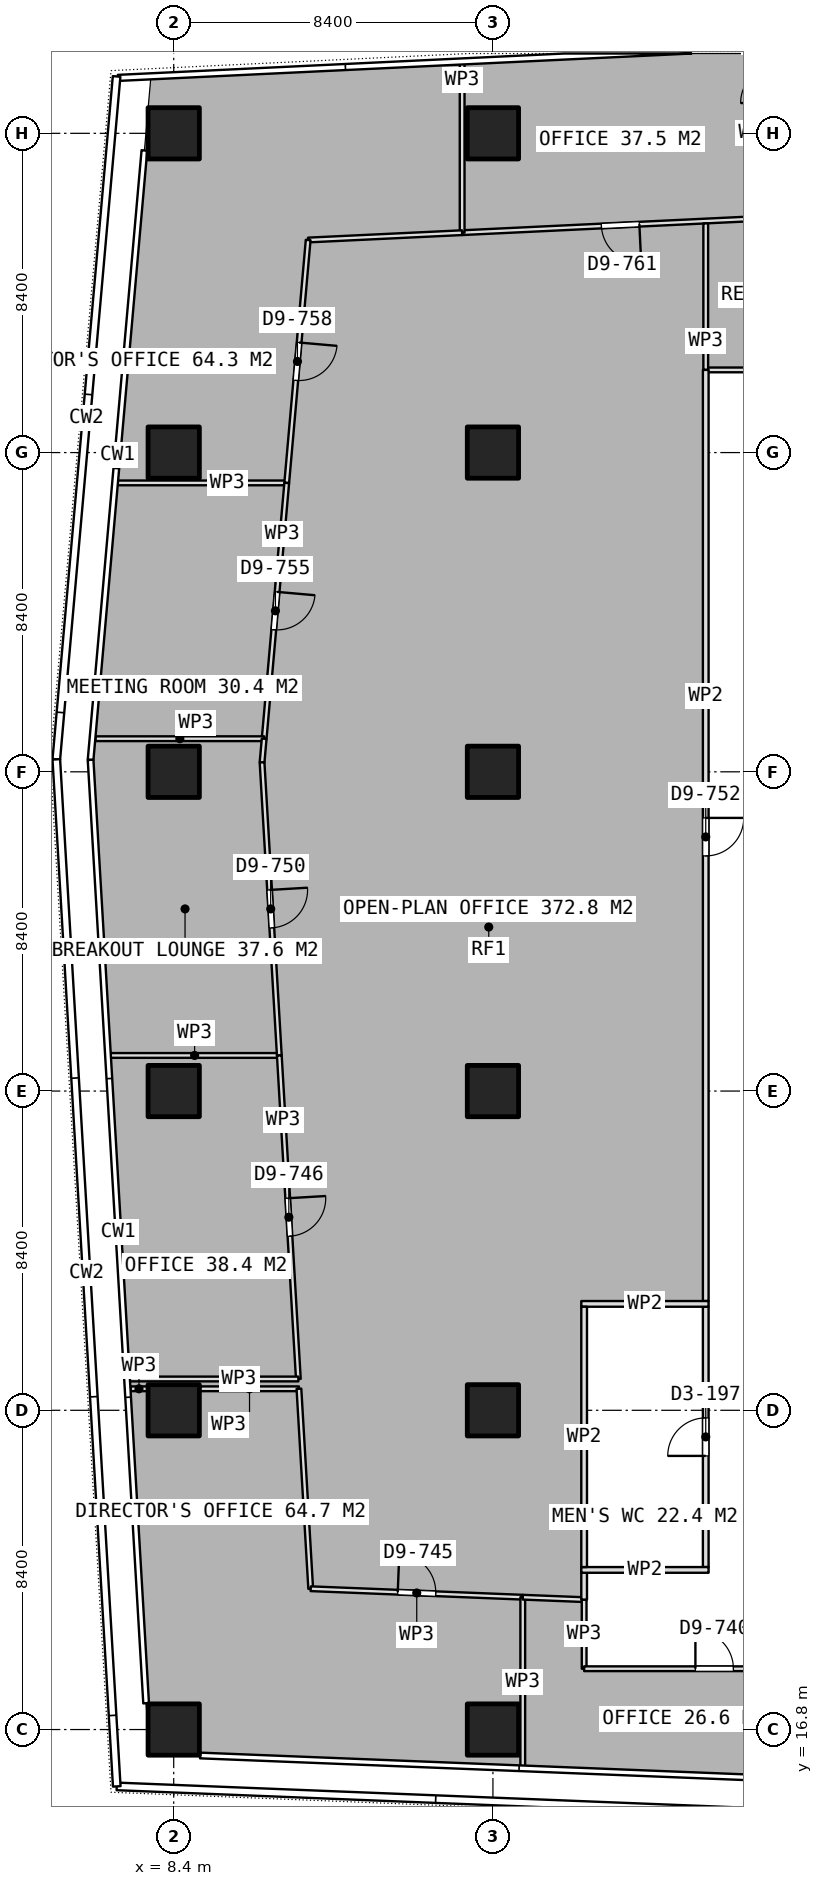
"""IFC4 building model, lengths in metres.
Left out: names, types, materials, properties, quantities, classifications, styles, units other than length and angle.
Written with IfcOpenShell. Run it as: python <this file> out.ifc"""

import sys

from ifc_helpers import new_model, si_unit, direction, frame, frame_2d, origin, origin_2d, place, context, subcontext, project, spatial, rectangle, extrude, element, fill, save


model = new_model("IFC4")
c1 = context("Model", 3, precision=1e-05, world=origin(), true_north=direction((0.0, 1.0)))
c2 = subcontext(c1, "Body", "Model", "MODEL_VIEW")
j1 = project(units=[si_unit("LENGTHUNIT", "METRE"), si_unit("PLANEANGLEUNIT", "RADIAN")], contexts=[c1])
p1 = place(None, origin())
s1 = spatial("IfcSite", under=j1, at=p1, CompositionType="ELEMENT")
p2 = place(p1, origin())
s2 = spatial("IfcBuilding", under=s1, at=p2, CompositionType="ELEMENT")
p3 = place(p2, frame((0.0, 0.0, 187.7)))
s3 = spatial("IfcBuildingStorey", under=s2, at=p3, CompositionType="ELEMENT", Elevation=187.7)
for number, where, z_axis, x_axis in (
    (1, (8.4, 16.8, 0.0), (0.0, 0.0, 1.0), (1.0, 0.0, 0.0)),
    (2, (8.4, 25.2, 0.0), (0.0, 0.0, 1.0), (1.0, 0.0, 0.0)),
    (3, (8.4, 33.6, 0.0), (0.0, 0.0, 1.0), (1.0, 0.0, 0.0)),
    (4, (8.4, 42.0, 0.0), (0.0, 0.0, 1.0), (1.0, 0.0, 0.0)),
    (5, (8.4, 50.4, 0.0), (0.0, 0.0, 1.0), (1.0, 0.0, 0.0)),
    (6, (8.4, 58.8, 0.0), (0.0, 0.0, 1.0), (1.0, 0.0, 0.0)),
    (7, (16.8, 16.8, 0.0), (0.0, 0.0, 1.0), (1.0, 0.0, 0.0)),
    (8, (16.8, 25.2, 0.0), (0.0, 0.0, 1.0), (1.0, 0.0, 0.0)),
    (9, (16.8, 33.6, 0.0), (0.0, 0.0, 1.0), (1.0, 0.0, 0.0)),
    (10, (16.8, 42.0, 0.0), (0.0, 0.0, 1.0), (1.0, 0.0, 0.0)),
    (11, (16.8, 50.4, 0.0), (0.0, 0.0, 1.0), (1.0, 0.0, 0.0)),
    (12, (16.8, 58.8, 0.0), (0.0, 0.0, 1.0), (1.0, 0.0, 0.0)),
):
    element("IfcColumn", number, at=place(p3, frame(where, z_axis=z_axis, x_axis=x_axis)), inside=s3, PredefinedType="COLUMN", context=c2, shape_type="SweptSolid", body=[
        extrude(rectangle(XDim=1.35, YDim=1.35, at=origin_2d()), origin(), (0.0, 0.0, 1.0), 3.75),
    ])
for number, where, z_axis, x_axis in (
    (13, (19.125, 21.0, 0.0), (0.0, 0.0, 1.0), (1.0, 0.0, 0.0)),
    (14, (19.125, 28.0, 0.0), (0.0, 0.0, 1.0), (1.0, 0.0, 0.0)),
):
    element("IfcWall", number, at=place(p3, frame(where, z_axis=z_axis, x_axis=x_axis)), inside=s3, PredefinedType="PARTITIONING", context=c2, shape_type="SweptSolid", body=[
        extrude(rectangle(XDim=3.35, YDim=0.15, at=frame_2d((1.675, 0.0))), origin(), (0.0, 0.0, 1.0), 3.5),
    ])
p4 = place(p3, frame((19.2, 21.075, 0.0), z_axis=(0.0, 0.0, 1.0), x_axis=(0.0, 1.0, 0.0)))
e15 = element("IfcWall", 15, at=p4, inside=s3, PredefinedType="PARTITIONING", context=c2, shape_type="SweptSolid", body=[
    extrude(rectangle(XDim=6.85, YDim=0.15, at=frame_2d((3.425, 0.0))), origin(), (0.0, 0.0, 1.0), 3.5),
])
p5 = place(p3, frame((22.4, 21.075, 0.0), z_axis=(0.0, 0.0, 1.0), x_axis=(0.0, 1.0, 0.0)))
e16 = element("IfcWall", 16, at=p5, inside=s3, PredefinedType="PARTITIONING", context=c2, shape_type="SweptSolid", body=[
    extrude(rectangle(XDim=6.85, YDim=0.15, at=frame_2d((3.425, 0.0))), origin(), (0.0, 0.0, 1.0), 3.5),
])
p6 = place(p5, frame((2.925, 0.0, 0.0)))
e17 = element("IfcOpeningElement", 17, at=p6, cuts=e16, PredefinedType="OPENING", context=c2, shape_type="SweptSolid", body=[
    extrude(rectangle(XDim=1.0, YDim=2.1, at=frame_2d((0.5, 1.05))), frame((0.0, 0.085, 0.0), z_axis=(0.0, -1.0, 0.0), x_axis=(1.0, 0.0, 0.0)), (0.0, 0.0, 1.0), 0.17),
])
p7 = place(p3, frame((7.267, 25.766, 0.0), z_axis=(0.0, 0.0, 1.0), x_axis=(1.0, 0.0, 0.0)))
e18 = element("IfcWall", 18, at=p7, inside=s3, PredefinedType="PARTITIONING", context=c2, shape_type="SweptSolid", body=[
    extrude(rectangle(XDim=0.438, YDim=0.125, at=frame_2d((0.219, 0.0))), origin(), (0.0, 0.0, 1.0), 3.5),
])
p8 = place(p3, frame((9.095, 25.766, 0.0), z_axis=(0.0, 0.0, 1.0), x_axis=(1.0, 0.0, 0.0)))
e19 = element("IfcWall", 19, at=p8, inside=s3, PredefinedType="PARTITIONING", context=c2, shape_type="SweptSolid", body=[
    extrude(rectangle(XDim=2.6, YDim=0.125, at=frame_2d((1.3, 0.0))), origin(), (0.0, 0.0, 1.0), 3.5),
])
p9 = place(p3, frame((11.695, 25.766, 0.0), z_axis=(0.0, 0.0, 1.0), x_axis=(0.058784478648, -0.998270697291, 0.0)))
e20 = element("IfcWall", 20, at=p9, inside=s3, PredefinedType="PARTITIONING", context=c2, shape_type="SweptSolid", body=[
    extrude(rectangle(XDim=5.27, YDim=0.125, at=frame_2d((2.635, 0.0))), origin(), (0.0, 0.0, 1.0), 3.5),
])
p10 = place(p3, frame((12.005, 20.505, 0.0), z_axis=(0.0, 0.0, 1.0), x_axis=(0.999203122171, -0.039913915407, 0.0)))
e21 = element("IfcWall", 21, at=p10, inside=s3, PredefinedType="PARTITIONING", context=c2, shape_type="SweptSolid", body=[
    extrude(rectangle(XDim=5.584, YDim=0.125, at=frame_2d((2.792, 0.0))), origin(), (0.0, 0.0, 1.0), 3.5),
])
p11 = place(p10, frame((2.292, 0.0, 0.0)))
e22 = element("IfcOpeningElement", 22, at=p11, cuts=e21, PredefinedType="OPENING", context=c2, shape_type="SweptSolid", body=[
    extrude(rectangle(XDim=1.0, YDim=2.1, at=frame_2d((0.5, 1.05))), frame((0.0, 0.073, 0.0), z_axis=(0.0, -1.0, 0.0), x_axis=(1.0, 0.0, 0.0)), (0.0, 0.0, 1.0), 0.145),
])
p12 = place(p3, frame((17.585, 20.282, 0.0), z_axis=(0.0, 0.0, 1.0), x_axis=(0.0, -1.0, 0.0)))
e23 = element("IfcWall", 23, at=p12, inside=s3, PredefinedType="PARTITIONING", context=c2, shape_type="SweptSolid", body=[
    extrude(rectangle(XDim=4.453, YDim=0.125, at=frame_2d((2.227, 0.0))), origin(), (0.0, 0.0, 1.0), 3.5),
])
p13 = place(p3, frame((17.586, 20.282, 0.0), z_axis=(0.0, 0.0, 1.0), x_axis=(0.999215619009, -0.039599832428, 0.0)))
e24 = element("IfcWall", 24, at=p13, inside=s3, PredefinedType="PARTITIONING", context=c2, shape_type="SweptSolid", body=[
    extrude(rectangle(XDim=1.615, YDim=0.125, at=frame_2d((0.808, 0.0))), origin(), (0.0, 0.0, 1.0), 3.5),
])
p14 = place(p3, frame((19.2, 20.218, 0.0), z_axis=(0.0, 0.0, 1.0), x_axis=(0.0, -1.0, 0.0)))
e25 = element("IfcWall", 25, at=p14, inside=s3, PredefinedType="PARTITIONING", context=c2, shape_type="SweptSolid", body=[
    extrude(rectangle(XDim=1.818, YDim=0.125, at=frame_2d((0.909, 0.0))), origin(), (0.0, 0.0, 1.0), 3.5),
])
p15 = place(p3, frame((19.2, 18.4, 0.0), z_axis=(0.0, 0.0, 1.0), x_axis=(1.0, 0.0, 0.0)))
e26 = element("IfcWall", 26, at=p15, inside=s3, PredefinedType="PARTITIONING", context=c2, shape_type="SweptSolid", body=[
    extrude(rectangle(XDim=6.857, YDim=0.125, at=frame_2d((3.428, 0.0))), origin(), (0.0, 0.0, 1.0), 3.5),
])
p16 = place(p15, frame((2.928, 0.0, 0.0)))
e27 = element("IfcOpeningElement", 27, at=p16, cuts=e26, PredefinedType="OPENING", context=c2, shape_type="SweptSolid", body=[
    extrude(rectangle(XDim=1.0, YDim=2.1, at=frame_2d((0.5, 1.05))), frame((0.0, 0.073, 0.0), z_axis=(0.0, -1.0, 0.0), x_axis=(1.0, 0.0, 0.0)), (0.0, 0.0, 1.0), 0.145),
])
p17 = place(p3, frame((24.317, 56.584, 0.0), z_axis=(0.0, 0.0, 1.0), x_axis=(-0.998859973319, -0.047736293327, 0.0)))
e28 = element("IfcWall", 28, at=p17, inside=s3, PredefinedType="PARTITIONING", context=c2, shape_type="SweptSolid", body=[
    extrude(rectangle(XDim=8.336, YDim=0.125, at=frame_2d((4.168, 0.0))), origin(), (0.0, 0.0, 1.0), 3.5),
])
p18 = place(p17, frame((3.668, 0.0, 0.0)))
e29 = element("IfcOpeningElement", 29, at=p18, cuts=e28, PredefinedType="OPENING", context=c2, shape_type="SweptSolid", body=[
    extrude(rectangle(XDim=1.0, YDim=2.1, at=frame_2d((0.5, 1.05))), frame((0.0, 0.073, 0.0), z_axis=(0.0, -1.0, 0.0), x_axis=(1.0, 0.0, 0.0)), (0.0, 0.0, 1.0), 0.145),
])
p19 = place(p3, frame((15.99, 56.186, 0.0), z_axis=(0.0, 0.0, 1.0), x_axis=(0.0, 1.0, 0.0)))
e30 = element("IfcWall", 30, at=p19, inside=s3, PredefinedType="PARTITIONING", context=c2, shape_type="SweptSolid", body=[
    extrude(rectangle(XDim=4.456, YDim=0.125, at=frame_2d((2.228, 0.0))), origin(), (0.0, 0.0, 1.0), 3.5),
])
p20 = place(p3, frame((11.374, 49.602, 0.0), z_axis=(0.0, 0.0, 1.0), x_axis=(-1.0, 0.0, 0.0)))
e31 = element("IfcWall", 31, at=p20, inside=s3, PredefinedType="PARTITIONING", context=c2, shape_type="SweptSolid", body=[
    extrude(rectangle(XDim=4.468, YDim=0.125, at=frame_2d((2.234, 0.0))), origin(), (0.0, 0.0, 1.0), 3.5),
])
p21 = place(p3, frame((15.989, 56.186, 0.0), z_axis=(0.0, 0.0, 1.0), x_axis=(-0.998865684895, -0.047616630914, 0.0)))
e32 = element("IfcWall", 32, at=p21, inside=s3, PredefinedType="PARTITIONING", context=c2, shape_type="SweptSolid", body=[
    extrude(rectangle(XDim=4.056, YDim=0.125, at=frame_2d((2.028, 0.0))), origin(), (0.0, 0.0, 1.0), 3.5),
])
p22 = place(p3, frame((11.938, 55.993, 0.0), z_axis=(0.0, 0.0, 1.0), x_axis=(-0.087903805485, -0.996128968046, 0.0)))
e33 = element("IfcWall", 33, at=p22, inside=s3, PredefinedType="PARTITIONING", context=c2, shape_type="SweptSolid", body=[
    extrude(rectangle(XDim=6.416, YDim=0.125, at=frame_2d((3.208, 0.0))), origin(), (0.0, 0.0, 1.0), 3.5),
])
p23 = place(p22, frame((2.708, 0.0, 0.0)))
e34 = element("IfcOpeningElement", 34, at=p23, cuts=e33, PredefinedType="OPENING", context=c2, shape_type="SweptSolid", body=[
    extrude(rectangle(XDim=1.0, YDim=2.1, at=frame_2d((0.5, 1.05))), frame((0.0, 0.073, 0.0), z_axis=(0.0, -1.0, 0.0), x_axis=(1.0, 0.0, 0.0)), (0.0, 0.0, 1.0), 0.145),
])
p24 = place(p3, frame((11.374, 49.601, 0.0), z_axis=(0.0, 0.0, 1.0), x_axis=(-0.087919121044, -0.9961276164, 0.0)))
e35 = element("IfcWall", 35, at=p24, inside=s3, PredefinedType="PARTITIONING", context=c2, shape_type="SweptSolid", body=[
    extrude(rectangle(XDim=6.756, YDim=0.125, at=frame_2d((3.378, 0.0))), origin(), (0.0, 0.0, 1.0), 3.5),
])
p25 = place(p24, frame((2.878, 0.0, 0.0)))
e36 = element("IfcOpeningElement", 36, at=p25, cuts=e35, PredefinedType="OPENING", context=c2, shape_type="SweptSolid", body=[
    extrude(rectangle(XDim=1.0, YDim=2.1, at=frame_2d((0.5, 1.05))), frame((0.0, 0.073, 0.0), z_axis=(0.0, -1.0, 0.0), x_axis=(1.0, 0.0, 0.0)), (0.0, 0.0, 1.0), 0.145),
])
p26 = place(p3, frame((10.78, 42.871, 0.0), z_axis=(0.0, 0.0, 1.0), x_axis=(-1.0, 0.0, 0.0)))
e37 = element("IfcWall", 37, at=p26, inside=s3, PredefinedType="PARTITIONING", context=c2, shape_type="SweptSolid", body=[
    extrude(rectangle(XDim=4.438, YDim=0.125, at=frame_2d((2.219, 0.0))), origin(), (0.0, 0.0, 1.0), 3.5),
])
p27 = place(p3, frame((11.179, 34.537, 0.0), z_axis=(0.0, 0.0, 1.0), x_axis=(-1.0, 0.0, 0.0)))
e38 = element("IfcWall", 38, at=p27, inside=s3, PredefinedType="PARTITIONING", context=c2, shape_type="SweptSolid", body=[
    extrude(rectangle(XDim=4.458, YDim=0.125, at=frame_2d((2.229, 0.0))), origin(), (0.0, 0.0, 1.0), 3.5),
])
p28 = place(p3, frame((10.78, 42.87, 0.0), z_axis=(0.0, 0.0, 1.0), x_axis=(-0.087962267132, -0.996123807346, 0.0)))
e39 = element("IfcWall", 39, at=p28, inside=s3, PredefinedType="PARTITIONING", context=c2, shape_type="SweptSolid", body=[
    extrude(rectangle(XDim=0.625, YDim=0.125, at=frame_2d((0.312, 0.0))), origin(), (0.0, 0.0, 1.0), 3.5),
])
p29 = place(p3, frame((10.725, 42.248, 0.0), z_axis=(0.0, 0.0, 1.0), x_axis=(0.058757225461, -0.998272301757, 0.0)))
e40 = element("IfcWall", 40, at=p29, inside=s3, PredefinedType="PARTITIONING", context=c2, shape_type="SweptSolid", body=[
    extrude(rectangle(XDim=7.724, YDim=0.125, at=frame_2d((3.862, 0.0))), origin(), (0.0, 0.0, 1.0), 3.5),
])
p30 = place(p29, frame((3.362, 0.0, 0.0)))
e41 = element("IfcOpeningElement", 41, at=p30, cuts=e40, PredefinedType="OPENING", context=c2, shape_type="SweptSolid", body=[
    extrude(rectangle(XDim=1.0, YDim=2.1, at=frame_2d((0.5, 1.05))), frame((0.0, 0.073, 0.0), z_axis=(0.0, -1.0, 0.0), x_axis=(1.0, 0.0, 0.0)), (0.0, 0.0, 1.0), 0.145),
])
p31 = place(p3, frame((11.179, 34.536, 0.0), z_axis=(0.0, 0.0, 1.0), x_axis=(0.058753912615, -0.998272496742, 0.0)))
e42 = element("IfcWall", 42, at=p31, inside=s3, PredefinedType="PARTITIONING", context=c2, shape_type="SweptSolid", body=[
    extrude(rectangle(XDim=8.527, YDim=0.125, at=frame_2d((4.263, 0.0))), origin(), (0.0, 0.0, 1.0), 3.5),
])
p32 = place(p31, frame((3.763, 0.0, 0.0)))
e43 = element("IfcOpeningElement", 43, at=p32, cuts=e42, PredefinedType="OPENING", context=c2, shape_type="SweptSolid", body=[
    extrude(rectangle(XDim=1.0, YDim=2.1, at=frame_2d((0.5, 1.05))), frame((0.0, 0.073, 0.0), z_axis=(0.0, -1.0, 0.0), x_axis=(1.0, 0.0, 0.0)), (0.0, 0.0, 1.0), 0.145),
])
p33 = place(p3, frame((11.68, 26.024, 0.0), z_axis=(0.0, 0.0, 1.0), x_axis=(-1.0, 0.0, 0.0)))
e44 = element("IfcWall", 44, at=p33, inside=s3, PredefinedType="PARTITIONING", context=c2, shape_type="SweptSolid", body=[
    extrude(rectangle(XDim=4.458, YDim=0.125, at=frame_2d((2.229, 0.0))), origin(), (0.0, 0.0, 1.0), 3.5),
])
p34 = place(p3, frame((28.4, 52.575, 0.0), z_axis=(0.0, 0.0, 1.0), x_axis=(-1.0, 0.0, 0.0)))
e45 = element("IfcWall", 45, at=p34, inside=s3, PredefinedType="PARTITIONING", context=c2, shape_type="SweptSolid", body=[
    extrude(rectangle(XDim=6.0, YDim=0.125, at=frame_2d((3.0, 0.0))), origin(), (0.0, 0.0, 1.0), 3.5),
])
p35 = place(p34, frame((2.5, 0.0, 0.0)))
e46 = element("IfcOpeningElement", 46, at=p35, cuts=e45, PredefinedType="OPENING", context=c2, shape_type="SweptSolid", body=[
    extrude(rectangle(XDim=1.0, YDim=2.1, at=frame_2d((0.5, 1.05))), frame((0.0, 0.073, 0.0), z_axis=(0.0, -1.0, 0.0), x_axis=(1.0, 0.0, 0.0)), (0.0, 0.0, 1.0), 0.145),
])
p36 = place(p3, frame((22.4, 52.575, 0.0), z_axis=(0.0, 0.0, 1.0), x_axis=(0.0, 1.0, 0.0)))
e47 = element("IfcWall", 47, at=p36, inside=s3, PredefinedType="PARTITIONING", context=c2, shape_type="SweptSolid", body=[
    extrude(rectangle(XDim=3.855, YDim=0.125, at=frame_2d((1.927, 0.0))), origin(), (0.0, 0.0, 1.0), 3.5),
])
p37 = place(p3, frame((22.4, 52.575, 0.0), z_axis=(0.0, 0.0, 1.0), x_axis=(0.0, -1.0, 0.0)))
e48 = element("IfcWall", 48, at=p37, inside=s3, PredefinedType="PARTITIONING", context=c2, shape_type="SweptSolid", body=[
    extrude(rectangle(XDim=24.5, YDim=0.15, at=frame_2d((12.25, 0.0))), origin(), (0.0, 0.0, 1.0), 3.5),
])
p38 = place(p37, frame((11.788, 0.0, 0.0)))
e49 = element("IfcOpeningElement", 49, at=p38, cuts=e48, PredefinedType="OPENING", context=c2, shape_type="SweptSolid", body=[
    extrude(rectangle(XDim=1.0, YDim=2.1, at=frame_2d((0.5, 1.05))), frame((0.0, 0.085, 0.0), z_axis=(0.0, -1.0, 0.0), x_axis=(1.0, 0.0, 0.0)), (0.0, 0.0, 1.0), 0.17),
])
p39 = place(p3, frame((19.2, 21.075, 0.0), z_axis=(0.0, 0.0, 1.0), x_axis=(0.0, -1.0, 0.0)))
e50 = element("IfcWall", 50, at=p39, inside=s3, PredefinedType="PARTITIONING", context=c2, shape_type="SweptSolid", body=[
    extrude(rectangle(XDim=0.857, YDim=0.15, at=frame_2d((0.428, 0.0))), origin(), (0.0, 0.0, 1.0), 3.5),
])
p40 = place(p6, origin())
e51 = element("IfcDoor", 51, at=p40, inside=s3, OperationType="SINGLE_SWING_LEFT", PredefinedType="DOOR", context=c2, shape_type="SweptSolid", body=[
    extrude(rectangle(XDim=1.0, YDim=2.1, at=frame_2d((0.5, 1.05))), frame((0.0, 0.025, 0.0), z_axis=(0.0, -1.0, 0.0), x_axis=(1.0, 0.0, 0.0)), (0.0, 0.0, 1.0), 0.05),
])
fill(e17, e51)
p41 = place(p11, origin())
e52 = element("IfcDoor", 52, at=p41, inside=s3, OperationType="SINGLE_SWING_LEFT", PredefinedType="DOOR", context=c2, shape_type="SweptSolid", body=[
    extrude(rectangle(XDim=1.0, YDim=2.1, at=frame_2d((0.5, 1.05))), frame((0.0, 0.025, 0.0), z_axis=(0.0, -1.0, 0.0), x_axis=(1.0, 0.0, 0.0)), (0.0, 0.0, 1.0), 0.05),
])
fill(e22, e52)
p42 = place(p16, origin())
e53 = element("IfcDoor", 53, at=p42, inside=s3, OperationType="SINGLE_SWING_LEFT", PredefinedType="DOOR", context=c2, shape_type="SweptSolid", body=[
    extrude(rectangle(XDim=1.0, YDim=2.1, at=frame_2d((0.5, 1.05))), frame((0.0, 0.025, 0.0), z_axis=(0.0, -1.0, 0.0), x_axis=(1.0, 0.0, 0.0)), (0.0, 0.0, 1.0), 0.05),
])
fill(e27, e53)
p43 = place(p18, origin())
e54 = element("IfcDoor", 54, at=p43, inside=s3, OperationType="SINGLE_SWING_LEFT", PredefinedType="DOOR", context=c2, shape_type="SweptSolid", body=[
    extrude(rectangle(XDim=1.0, YDim=2.1, at=frame_2d((0.5, 1.05))), frame((0.0, 0.025, 0.0), z_axis=(0.0, -1.0, 0.0), x_axis=(1.0, 0.0, 0.0)), (0.0, 0.0, 1.0), 0.05),
])
fill(e29, e54)
p44 = place(p23, origin())
e55 = element("IfcDoor", 55, at=p44, inside=s3, OperationType="SINGLE_SWING_LEFT", PredefinedType="DOOR", context=c2, shape_type="SweptSolid", body=[
    extrude(rectangle(XDim=1.0, YDim=2.1, at=frame_2d((0.5, 1.05))), frame((0.0, 0.025, 0.0), z_axis=(0.0, -1.0, 0.0), x_axis=(1.0, 0.0, 0.0)), (0.0, 0.0, 1.0), 0.05),
])
fill(e34, e55)
p45 = place(p25, origin())
e56 = element("IfcDoor", 56, at=p45, inside=s3, OperationType="SINGLE_SWING_LEFT", PredefinedType="DOOR", context=c2, shape_type="SweptSolid", body=[
    extrude(rectangle(XDim=1.0, YDim=2.1, at=frame_2d((0.5, 1.05))), frame((0.0, 0.025, 0.0), z_axis=(0.0, -1.0, 0.0), x_axis=(1.0, 0.0, 0.0)), (0.0, 0.0, 1.0), 0.05),
])
fill(e36, e56)
p46 = place(p30, origin())
e57 = element("IfcDoor", 57, at=p46, inside=s3, OperationType="SINGLE_SWING_LEFT", PredefinedType="DOOR", context=c2, shape_type="SweptSolid", body=[
    extrude(rectangle(XDim=1.0, YDim=2.1, at=frame_2d((0.5, 1.05))), frame((0.0, 0.025, 0.0), z_axis=(0.0, -1.0, 0.0), x_axis=(1.0, 0.0, 0.0)), (0.0, 0.0, 1.0), 0.05),
])
fill(e41, e57)
p47 = place(p32, origin())
e58 = element("IfcDoor", 58, at=p47, inside=s3, OperationType="SINGLE_SWING_LEFT", PredefinedType="DOOR", context=c2, shape_type="SweptSolid", body=[
    extrude(rectangle(XDim=1.0, YDim=2.1, at=frame_2d((0.5, 1.05))), frame((0.0, 0.025, 0.0), z_axis=(0.0, -1.0, 0.0), x_axis=(1.0, 0.0, 0.0)), (0.0, 0.0, 1.0), 0.05),
])
fill(e43, e58)
p48 = place(p38, origin())
e59 = element("IfcDoor", 59, at=p48, inside=s3, OperationType="SINGLE_SWING_LEFT", PredefinedType="DOOR", context=c2, shape_type="SweptSolid", body=[
    extrude(rectangle(XDim=1.0, YDim=2.1, at=frame_2d((0.5, 1.05))), frame((0.0, 0.025, 0.0), z_axis=(0.0, -1.0, 0.0), x_axis=(1.0, 0.0, 0.0)), (0.0, 0.0, 1.0), 0.05),
])
fill(e49, e59)
save(model, sys.argv[1])
